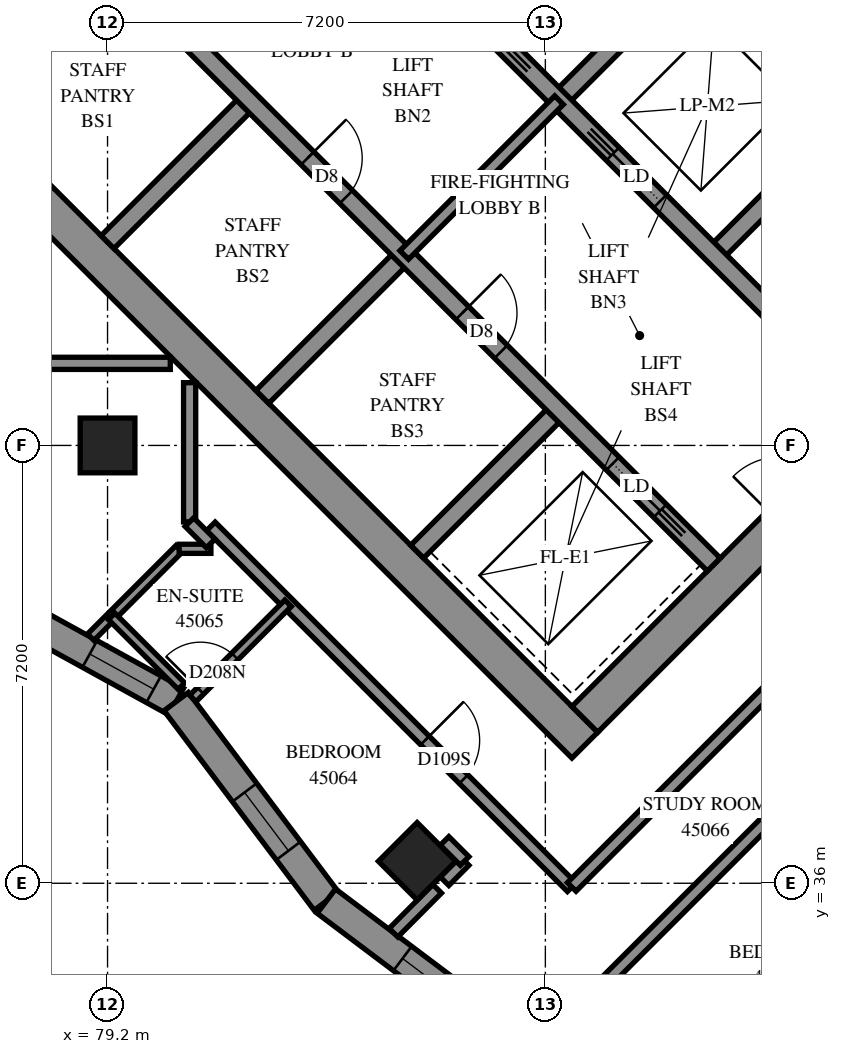
"""IFC4 building model, lengths in metres.
Left out: names, types, materials, properties, quantities, classifications, styles, units other than length and angle.
Written with IfcOpenShell. Run it as: python <this file> out.ifc"""

import sys

from ifc_helpers import new_model, si_unit, direction, frame, frame_2d, origin, origin_2d, place, context, subcontext, project, spatial, polyline, rectangle, outline, extrude, element, fill, save


model = new_model("IFC4")
c1 = context("Model", 3, precision=1e-05, world=origin(), true_north=direction((0.0, 1.0)))
c2 = subcontext(c1, "Body", "Model", "MODEL_VIEW")
j1 = project(units=[si_unit("LENGTHUNIT", "METRE"), si_unit("PLANEANGLEUNIT", "RADIAN")], contexts=[c1])
p1 = place(None, origin())
s1 = spatial("IfcSite", under=j1, at=p1, CompositionType="ELEMENT")
p2 = place(p1, origin())
s2 = spatial("IfcBuilding", under=s1, at=p2, CompositionType="ELEMENT")
p3 = place(p2, frame((0.0, 0.0, 166.0)))
s3 = spatial("IfcBuildingStorey", under=s2, at=p3, CompositionType="ELEMENT", Elevation=166.0)
for number, where, z_axis, x_axis in (
    (1, (79.2, 43.2, 0.0), (0.0, 0.0, 1.0), (1.0, 0.0, 0.0)),
    (2, (84.291, 36.362, 0.0), (0.0, 0.0, 1.0), (0.707, -0.707, 0.0)),
):
    element("IfcColumn", number, at=place(p3, frame(where, z_axis=z_axis, x_axis=x_axis)), inside=s3, PredefinedType="COLUMN", context=c2, shape_type="SweptSolid", body=[
        extrude(rectangle(XDim=0.9, YDim=0.9, at=origin_2d()), origin(), (0.0, 0.0, 1.0), 3.1),
    ])
p4 = place(p3, frame((76.018, 49.302, -0.3), z_axis=(0.0, 0.0, 1.0), x_axis=(0.7071067812, -0.7071067812, 0.0)))
e3 = element("IfcWall", 3, at=p4, inside=s3, PredefinedType="SHEAR", context=c2, shape_type="SweptSolid", body=[
    extrude(rectangle(XDim=15.6, YDim=0.6, at=frame_2d((7.8, 0.0))), origin(), (0.0, 0.0, 1.0), 2.7),
])
p5 = place(p3, frame((86.625, 59.908, -0.3), z_axis=(0.0, 0.0, 1.0), x_axis=(0.7071067812, -0.7071067812, 0.0)))
e4 = element("IfcWall", 4, at=p5, inside=s3, PredefinedType="SHEAR", context=c2, shape_type="SweptSolid", body=[
    extrude(rectangle(XDim=15.6, YDim=0.6, at=frame_2d((7.8, 0.0))), origin(), (0.0, 0.0, 1.0), 2.7),
])
p6 = place(p5, frame((10.6, 0.0, 0.3)))
e5 = element("IfcOpeningElement", 5, at=p6, cuts=e4, PredefinedType="OPENING", context=c2, shape_type="SweptSolid", body=[
    extrude(rectangle(XDim=0.8, YDim=2.1, at=frame_2d((0.4, 1.05))), frame((0.0, 0.31, 0.0), z_axis=(0.0, -1.0, 0.0), x_axis=(1.0, 0.0, 0.0)), (0.0, 0.0, 1.0), 0.62),
])
p7 = place(p3, frame((76.442, 49.302, -0.3), z_axis=(0.0, 0.0, 1.0), x_axis=(0.7071067812, 0.7071067812, 0.0)))
e6 = element("IfcWall", 6, at=p7, inside=s3, PredefinedType="SHEAR", context=c2, shape_type="SweptSolid", body=[
    extrude(rectangle(XDim=14.4, YDim=0.6, at=frame_2d((7.2, 0.0))), origin(), (0.0, 0.0, 1.0), 2.7),
])
p8 = place(p7, frame((4.55, 0.0, 0.3)))
e7 = element("IfcOpeningElement", 7, at=p8, cuts=e6, PredefinedType="OPENING", context=c2, shape_type="SweptSolid", body=[
    extrude(rectangle(XDim=1.1, YDim=2.1, at=frame_2d((0.55, 1.05))), frame((0.0, 0.31, 0.0), z_axis=(0.0, -1.0, 0.0), x_axis=(1.0, 0.0, 0.0)), (0.0, 0.0, 1.0), 0.62),
])
p9 = place(p7, frame((11.35, 0.0, 0.3)))
e8 = element("IfcOpeningElement", 8, at=p9, cuts=e6, PredefinedType="OPENING", context=c2, shape_type="SweptSolid", body=[
    extrude(rectangle(XDim=1.1, YDim=2.1, at=frame_2d((0.55, 1.05))), frame((0.0, 0.31, 0.0), z_axis=(0.0, -1.0, 0.0), x_axis=(1.0, 0.0, 0.0)), (0.0, 0.0, 1.0), 0.62),
])
p10 = place(p3, frame((87.049, 38.695, -0.3), z_axis=(0.0, 0.0, 1.0), x_axis=(0.7071067812, 0.7071067812, 0.0)))
e9 = element("IfcWall", 9, at=p10, inside=s3, PredefinedType="SHEAR", context=c2, shape_type="SweptSolid", body=[
    extrude(rectangle(XDim=14.4, YDim=0.6, at=frame_2d((7.2, 0.0))), origin(), (0.0, 0.0, 1.0), 2.7),
])
p11 = place(p10, frame((4.55, 0.0, 0.3)))
e10 = element("IfcOpeningElement", 10, at=p11, cuts=e9, PredefinedType="OPENING", context=c2, shape_type="SweptSolid", body=[
    extrude(rectangle(XDim=1.1, YDim=2.1, at=frame_2d((0.55, 1.05))), frame((0.0, 0.31, 0.0), z_axis=(0.0, -1.0, 0.0), x_axis=(1.0, 0.0, 0.0)), (0.0, 0.0, 1.0), 0.62),
])
p12 = place(p10, frame((11.35, 0.0, 0.3)))
e11 = element("IfcOpeningElement", 11, at=p12, cuts=e9, PredefinedType="OPENING", context=c2, shape_type="SweptSolid", body=[
    extrude(rectangle(XDim=1.1, YDim=2.1, at=frame_2d((0.55, 1.05))), frame((0.0, 0.31, 0.0), z_axis=(0.0, -1.0, 0.0), x_axis=(1.0, 0.0, 0.0)), (0.0, 0.0, 1.0), 0.62),
])
p13 = place(p3, frame((79.2, 46.544, 0.0), z_axis=(0.0, 0.0, 1.0), x_axis=(0.7071219326, 0.7070916295, 0.0)))
e12 = element("IfcWall", 12, at=p13, inside=s3, PredefinedType="SOLIDWALL", context=c2, shape_type="SweptSolid", body=[
    extrude(rectangle(XDim=3.3, YDim=0.3, at=frame_2d((1.65, 0.0))), origin(), (0.0, 0.0, 1.0), 3.1),
])
p14 = place(p3, frame((81.746, 43.999, 0.0), z_axis=(0.0, 0.0, 1.0), x_axis=(0.7071067812, 0.7071067812, 0.0)))
e13 = element("IfcWall", 13, at=p14, inside=s3, PredefinedType="SOLIDWALL", context=c2, shape_type="SweptSolid", body=[
    extrude(rectangle(XDim=3.3, YDim=0.3, at=frame_2d((1.65, 0.0))), origin(), (0.0, 0.0, 1.0), 3.1),
])
p15 = place(p3, frame((86.625, 48.878, 0.0), z_axis=(0.0, 0.0, 1.0), x_axis=(0.7071067812, 0.7071067812, 0.0)))
e14 = element("IfcWall", 14, at=p15, inside=s3, PredefinedType="SOLIDWALL", context=c2, shape_type="SweptSolid", body=[
    extrude(rectangle(XDim=3.3, YDim=0.3, at=frame_2d((1.65, 0.0))), origin(), (0.0, 0.0, 1.0), 3.1),
])
p16 = place(p3, frame((84.291, 41.453, 0.0), z_axis=(0.0, 0.0, 1.0), x_axis=(0.7071067812, 0.7071067812, 0.0)))
e15 = element("IfcWall", 15, at=p16, inside=s3, PredefinedType="SOLIDWALL", context=c2, shape_type="SweptSolid", body=[
    extrude(rectangle(XDim=3.3, YDim=0.3, at=frame_2d((1.65, 0.0))), origin(), (0.0, 0.0, 1.0), 3.1),
])
p17 = place(p3, frame((89.17, 46.332, 0.0), z_axis=(0.0, 0.0, 1.0), x_axis=(0.7071067812, 0.7071067812, 0.0)))
e16 = element("IfcWall", 16, at=p17, inside=s3, PredefinedType="SOLIDWALL", context=c2, shape_type="SweptSolid", body=[
    extrude(rectangle(XDim=3.3, YDim=0.3, at=frame_2d((1.65, 0.0))), origin(), (0.0, 0.0, 1.0), 3.1),
])
p18 = place(p3, frame((78.988, 51.423, 0.0), z_axis=(0.0, 0.0, 1.0), x_axis=(0.7071067812, -0.7071067812, 0.0)))
e17 = element("IfcWall", 17, at=p18, inside=s3, PredefinedType="SOLIDWALL", context=c2, shape_type="SweptSolid", body=[
    extrude(rectangle(XDim=14.4, YDim=0.3, at=frame_2d((7.2, 0.0))), origin(), (0.0, 0.0, 1.0), 3.1),
])
p19 = place(p18, frame((1.35, 0.0, 0.0)))
e18 = element("IfcOpeningElement", 18, at=p19, cuts=e17, PredefinedType="OPENING", context=c2, shape_type="SweptSolid", body=[
    extrude(rectangle(XDim=0.9, YDim=2.1, at=frame_2d((0.45, 1.05))), frame((0.0, 0.16, 0.0), z_axis=(0.0, -1.0, 0.0), x_axis=(1.0, 0.0, 0.0)), (0.0, 0.0, 1.0), 0.32),
])
p20 = place(p18, frame((4.95, 0.0, 0.0)))
e19 = element("IfcOpeningElement", 19, at=p20, cuts=e17, PredefinedType="OPENING", context=c2, shape_type="SweptSolid", body=[
    extrude(rectangle(XDim=0.9, YDim=2.1, at=frame_2d((0.45, 1.05))), frame((0.0, 0.16, 0.0), z_axis=(0.0, -1.0, 0.0), x_axis=(1.0, 0.0, 0.0)), (0.0, 0.0, 1.0), 0.32),
])
p21 = place(p18, frame((8.55, 0.0, 0.0)))
e20 = element("IfcOpeningElement", 20, at=p21, cuts=e17, PredefinedType="OPENING", context=c2, shape_type="SweptSolid", body=[
    extrude(rectangle(XDim=0.9, YDim=2.1, at=frame_2d((0.45, 1.05))), frame((0.0, 0.16, 0.0), z_axis=(0.0, -1.0, 0.0), x_axis=(1.0, 0.0, 0.0)), (0.0, 0.0, 1.0), 0.32),
])
p22 = place(p18, frame((12.05, 0.0, 0.0)))
e21 = element("IfcOpeningElement", 21, at=p22, cuts=e17, PredefinedType="OPENING", context=c2, shape_type="SweptSolid", body=[
    extrude(rectangle(XDim=1.1, YDim=2.1, at=frame_2d((0.55, 1.05))), frame((0.0, 0.16, 0.0), z_axis=(0.0, -1.0, 0.0), x_axis=(1.0, 0.0, 0.0)), (0.0, 0.0, 1.0), 0.32),
])
p23 = place(p3, frame((81.534, 53.969, 0.0), z_axis=(0.0, 0.0, 1.0), x_axis=(0.707103309, -0.7071102534, 0.0)))
e22 = element("IfcWall", 22, at=p23, inside=s3, PredefinedType="SOLIDWALL", context=c2, shape_type="SweptSolid", body=[
    extrude(rectangle(XDim=14.4, YDim=0.3, at=frame_2d((7.2, 0.0))), origin(), (0.0, 0.0, 1.0), 3.1),
])
p24 = place(p23, frame((1.25, 0.0, 0.0)))
e23 = element("IfcOpeningElement", 23, at=p24, cuts=e22, PredefinedType="OPENING", context=c2, shape_type="SweptSolid", body=[
    extrude(rectangle(XDim=1.1, YDim=2.1, at=frame_2d((0.55, 1.05))), frame((0.0, 0.16, 0.0), z_axis=(0.0, -1.0, 0.0), x_axis=(1.0, 0.0, 0.0)), (0.0, 0.0, 1.0), 0.32),
])
p25 = place(p23, frame((4.85, 0.0, 0.0)))
e24 = element("IfcOpeningElement", 24, at=p25, cuts=e22, PredefinedType="OPENING", context=c2, shape_type="SweptSolid", body=[
    extrude(rectangle(XDim=1.1, YDim=2.1, at=frame_2d((0.55, 1.05))), frame((0.0, 0.16, 0.0), z_axis=(0.0, -1.0, 0.0), x_axis=(1.0, 0.0, 0.0)), (0.0, 0.0, 1.0), 0.32),
])
p26 = place(p23, frame((8.45, 0.0, 0.0)))
e25 = element("IfcOpeningElement", 25, at=p26, cuts=e22, PredefinedType="OPENING", context=c2, shape_type="SweptSolid", body=[
    extrude(rectangle(XDim=1.1, YDim=2.1, at=frame_2d((0.55, 1.05))), frame((0.0, 0.16, 0.0), z_axis=(0.0, -1.0, 0.0), x_axis=(1.0, 0.0, 0.0)), (0.0, 0.0, 1.0), 0.32),
])
p27 = place(p23, frame((12.05, 0.0, 0.0)))
e26 = element("IfcOpeningElement", 26, at=p27, cuts=e22, PredefinedType="OPENING", context=c2, shape_type="SweptSolid", body=[
    extrude(rectangle(XDim=1.1, YDim=2.1, at=frame_2d((0.55, 1.05))), frame((0.0, 0.16, 0.0), z_axis=(0.0, -1.0, 0.0), x_axis=(1.0, 0.0, 0.0)), (0.0, 0.0, 1.0), 0.32),
])
p28 = place(p3, frame((88.958, 51.211, 0.0), z_axis=(0.0, 0.0, 1.0), x_axis=(0.7070998367, -0.7071137256, 0.0)))
e27 = element("IfcWall", 27, at=p28, inside=s3, PredefinedType="SOLIDWALL", context=c2, shape_type="SweptSolid", body=[
    extrude(rectangle(XDim=7.2, YDim=0.3, at=frame_2d((3.6, 0.0))), origin(), (0.0, 0.0, 1.0), 3.1),
])
p29 = place(p3, frame((76.572, 41.057, 0.0), z_axis=(0.0, 0.0, 1.0), x_axis=(0.8758607795, -0.4825638765, 0.0)))
e28 = element("IfcWall", 28, at=p29, inside=s3, PredefinedType="SOLIDWALL", context=c2, shape_type="SweptSolid", body=[
    extrude(outline(polyline([(0.022, -0.25), (4.236, -0.25), (4.343, 0.25), (-0.022, 0.25), (0.022, -0.25)])), origin(), (0.0, 0.0, 1.0), 3.1),
])
p30 = place(p29, frame((0.322, 0.0, 0.45)))
e29 = element("IfcOpeningElement", 29, at=p30, cuts=e28, PredefinedType="OPENING", context=c2, shape_type="SweptSolid", body=[
    extrude(rectangle(XDim=1.2, YDim=2.5, at=frame_2d((0.6, 1.25))), frame((0.0, 0.26, 0.0), z_axis=(0.0, -1.0, 0.0), x_axis=(1.0, 0.0, 0.0)), (0.0, 0.0, 1.0), 0.52),
])
p31 = place(p29, frame((2.666, 0.0, 0.45)))
e30 = element("IfcOpeningElement", 30, at=p31, cuts=e28, PredefinedType="OPENING", context=c2, shape_type="SweptSolid", body=[
    extrude(rectangle(XDim=1.2, YDim=2.5, at=frame_2d((0.6, 1.25))), frame((0.0, 0.26, 0.0), z_axis=(0.0, -1.0, 0.0), x_axis=(1.0, 0.0, 0.0)), (0.0, 0.0, 1.0), 0.52),
])
p32 = place(p3, frame((80.329, 38.987, 0.0), z_axis=(0.0, 0.0, 1.0), x_axis=(0.601211036, -0.7990902891, 0.0)))
e31 = element("IfcWall", 31, at=p32, inside=s3, PredefinedType="SOLIDWALL", context=c2, shape_type="SweptSolid", body=[
    extrude(outline(polyline([(0.054, -0.25), (4.142, -0.25), (4.071, 0.25), (-0.054, 0.25), (0.054, -0.25)])), origin(), (0.0, 0.0, 1.0), 3.1),
])
p33 = place(p32, frame((1.87, 0.0, 0.45)))
e32 = element("IfcOpeningElement", 32, at=p33, cuts=e31, PredefinedType="OPENING", context=c2, shape_type="SweptSolid", body=[
    extrude(rectangle(XDim=1.2, YDim=2.5, at=frame_2d((0.6, 1.25))), frame((0.0, 0.26, 0.0), z_axis=(0.0, -1.0, 0.0), x_axis=(1.0, 0.0, 0.0)), (0.0, 0.0, 1.0), 0.52),
])
p34 = place(p3, frame((82.798, 35.706, 0.0), z_axis=(0.0, 0.0, 1.0), x_axis=(0.7990920997, -0.6012086295, 0.0)))
e33 = element("IfcWall", 33, at=p34, inside=s3, PredefinedType="SOLIDWALL", context=c2, shape_type="SweptSolid", body=[
    extrude(outline(polyline([(-0.035, -0.25), (4.053, -0.25), (4.124, 0.25), (0.035, 0.25), (-0.035, -0.25)])), origin(), (0.0, 0.0, 1.0), 3.1),
])
p35 = place(p34, frame((1.569, 0.0, 0.7)))
e34 = element("IfcOpeningElement", 34, at=p35, cuts=e33, PredefinedType="OPENING", context=c2, shape_type="SweptSolid", body=[
    extrude(rectangle(XDim=1.8, YDim=2.2, at=frame_2d((0.9, 1.1))), frame((0.0, 0.26, 0.0), z_axis=(0.0, -1.0, 0.0), x_axis=(1.0, 0.0, 0.0)), (0.0, 0.0, 1.0), 0.52),
])
p36 = place(p3, frame((84.079, 46.332, 0.0), z_axis=(0.0, 0.0, 1.0), x_axis=(0.7071067812, 0.7071067812, 0.0)))
e35 = element("IfcWall", 35, at=p36, inside=s3, PredefinedType="PARTITIONING", context=c2, shape_type="SweptSolid", body=[
    extrude(rectangle(XDim=3.6, YDim=0.2, at=frame_2d((1.8, 0.0))), origin(), (0.0, 0.0, 1.0), 3.1),
])
p37 = place(p3, frame((80.899, 41.869, 0.0), z_axis=(0.0, 0.0, 1.0), x_axis=(0.7071067812, -0.7071067812, 0.0)))
e36 = element("IfcWall", 36, at=p37, inside=s3, PredefinedType="PARTITIONING", context=c2, shape_type="SweptSolid", body=[
    extrude(rectangle(XDim=8.392, YDim=0.2, at=frame_2d((4.196, 0.0))), origin(), (0.0, 0.0, 1.0), 3.1),
])
p38 = place(p37, frame((4.979, 0.0, 0.0)))
e37 = element("IfcOpeningElement", 37, at=p38, cuts=e36, PredefinedType="OPENING", context=c2, shape_type="SweptSolid", body=[
    extrude(rectangle(XDim=0.9, YDim=2.1, at=frame_2d((0.45, 1.05))), frame((0.0, 0.11, 0.0), z_axis=(0.0, -1.0, 0.0), x_axis=(1.0, 0.0, 0.0)), (0.0, 0.0, 1.0), 0.22),
])
p39 = place(p3, frame((86.834, 35.94, 0.0), z_axis=(0.0, 0.0, 1.0), x_axis=(0.7072486139, 0.7069649201, 0.0)))
e38 = element("IfcWall", 38, at=p39, inside=s3, PredefinedType="PARTITIONING", context=c2, shape_type="SweptSolid", body=[
    extrude(rectangle(XDim=7.05, YDim=0.2, at=frame_2d((3.525, 0.0))), origin(), (0.0, 0.0, 1.0), 3.1),
])
p40 = place(p39, frame((5.848, 0.0, 0.0)))
e39 = element("IfcOpeningElement", 39, at=p40, cuts=e38, PredefinedType="OPENING", context=c2, shape_type="SweptSolid", body=[
    extrude(rectangle(XDim=1.0, YDim=2.1, at=frame_2d((0.5, 1.05))), frame((0.0, 0.11, 0.0), z_axis=(0.0, -1.0, 0.0), x_axis=(1.0, 0.0, 0.0)), (0.0, 0.0, 1.0), 0.22),
])
p41 = place(p3, frame((86.329, 33.313, 0.0), z_axis=(0.0, 0.0, 1.0), x_axis=(0.7072524412, 0.7069610911, 0.0)))
e40 = element("IfcWall", 40, at=p41, inside=s3, PredefinedType="PARTITIONING", context=c2, shape_type="SweptSolid", body=[
    extrude(rectangle(XDim=6.865, YDim=0.2, at=frame_2d((3.432, 0.0))), origin(), (0.0, 0.0, 1.0), 3.1),
])
p42 = place(p3, frame((89.831, 31.721, 0.0), z_axis=(0.0, 0.0, 1.0), x_axis=(0.7071067812, 0.7071067812, 0.0)))
e41 = element("IfcWall", 41, at=p42, inside=s3, PredefinedType="PARTITIONING", context=c2, shape_type="SweptSolid", body=[
    extrude(rectangle(XDim=5.928, YDim=0.2, at=frame_2d((2.964, 0.0))), origin(), (0.0, 0.0, 1.0), 3.1),
])
for number, where, z_axis, x_axis in (
    (42, (77.942, 44.55, 0.0), (0.0, 0.0, 1.0), (1.0, 0.0, 0.0)),
    (43, (80.55, 41.942, 0.0), (0.0, 0.0, 1.0), (0.0, 1.0, 0.0)),
):
    element("IfcWall", number, at=place(p3, frame(where, z_axis=z_axis, x_axis=x_axis)), inside=s3, PredefinedType="PARTITIONING", context=c2, shape_type="SweptSolid", body=[
        extrude(rectangle(XDim=2.29, YDim=0.2, at=frame_2d((1.145, 0.0))), origin(), (0.0, 0.0, 1.0), 3.1),
    ])
p43 = place(p3, frame((80.603, 39.039, 0.0), z_axis=(0.0, 0.0, 1.0), x_axis=(0.7071293598, 0.7070842018, 0.0)))
e44 = element("IfcWall", 44, at=p43, inside=s3, PredefinedType="PARTITIONING", context=c2, shape_type="SweptSolid", body=[
    extrude(rectangle(XDim=2.214, YDim=0.15, at=frame_2d((1.107, 0.0))), origin(), (0.0, 0.0, 1.0), 3.1),
])
p44 = place(p43, frame((0.177, 0.0, 0.0)))
e45 = element("IfcOpeningElement", 45, at=p44, cuts=e44, PredefinedType="OPENING", context=c2, shape_type="SweptSolid", body=[
    extrude(rectangle(XDim=0.8, YDim=2.1, at=frame_2d((0.4, 1.05))), frame((0.0, 0.085, 0.0), z_axis=(0.0, -1.0, 0.0), x_axis=(1.0, 0.0, 0.0)), (0.0, 0.0, 1.0), 0.17),
])
p45 = place(p3, frame((78.924, 40.047, 0.0), z_axis=(0.0, 0.0, 1.0), x_axis=(0.7071067812, 0.7071067812, 0.0)))
e46 = element("IfcWall", 46, at=p45, inside=s3, PredefinedType="PARTITIONING", context=c2, shape_type="SweptSolid", body=[
    extrude(rectangle(XDim=2.056, YDim=0.15, at=frame_2d((1.028, 0.0))), origin(), (0.0, 0.0, 1.0), 3.1),
])
p46 = place(p3, frame((79.267, 40.389, 0.0), z_axis=(0.0, 0.0, 1.0), x_axis=(0.7071375765, -0.7070759845, 0.0)))
e47 = element("IfcWall", 47, at=p46, inside=s3, PredefinedType="PARTITIONING", context=c2, shape_type="SweptSolid", body=[
    extrude(rectangle(XDim=1.624, YDim=0.15, at=frame_2d((0.812, 0.0))), origin(), (0.0, 0.0, 1.0), 3.1),
])
p47 = place(p3, frame((83.903, 35.188, 0.0), z_axis=(0.0, 0.0, 1.0), x_axis=(0.705188447, 0.7090199251, 0.0)))
e48 = element("IfcWall", 48, at=p47, inside=s3, PredefinedType="PARTITIONING", context=c2, shape_type="SweptSolid", body=[
    extrude(rectangle(XDim=1.018, YDim=0.2, at=frame_2d((0.509, 0.0))), origin(), (0.0, 0.0, 1.0), 3.1),
])
p48 = place(p3, frame((80.378, 41.5, 0.0), z_axis=(0.0, 0.0, 1.0), x_axis=(1.0, 0.0, 0.0)))
e49 = element("IfcWall", 49, at=p48, inside=s3, PredefinedType="PARTITIONING", context=c2, shape_type="SweptSolid", body=[
    extrude(rectangle(XDim=0.522, YDim=0.15, at=frame_2d((0.261, 0.0))), origin(), (0.0, 0.0, 1.0), 3.1),
])
p49 = place(p3, frame((80.546, 41.938, 0.0), z_axis=(0.0, 0.0, 1.0), x_axis=(0.7071067812, -0.7071067812, 0.0)))
e50 = element("IfcWall", 50, at=p49, inside=s3, PredefinedType="PARTITIONING", context=c2, shape_type="SweptSolid", body=[
    extrude(rectangle(XDim=0.495, YDim=0.2, at=frame_2d((0.247, 0.0))), origin(), (0.0, 0.0, 1.0), 3.1),
])
p50 = place(p3, frame((84.742, 36.034, 0.0), z_axis=(0.0, 0.0, 1.0), x_axis=(0.7049672897, 0.7092398187, 0.0)))
e51 = element("IfcWall", 51, at=p50, inside=s3, PredefinedType="PARTITIONING", context=c2, shape_type="SweptSolid", body=[
    extrude(rectangle(XDim=0.468, YDim=0.2, at=frame_2d((0.234, 0.0))), origin(), (0.0, 0.0, 1.0), 3.1),
])
p51 = place(p3, frame((84.742, 36.696, 0.0), z_axis=(0.0, 0.0, 1.0), x_axis=(0.7071067812, -0.7071067812, 0.0)))
e52 = element("IfcWall", 52, at=p51, inside=s3, PredefinedType="PARTITIONING", context=c2, shape_type="SweptSolid", body=[
    extrude(rectangle(XDim=0.467, YDim=0.2, at=frame_2d((0.233, 0.0))), origin(), (0.0, 0.0, 1.0), 3.1),
])
p52 = place(p31, origin())
e53 = element("IfcWindow", 53, at=p52, inside=s3, PartitioningType="SINGLE_PANEL", PredefinedType="WINDOW", context=c2, shape_type="SweptSolid", body=[
    extrude(rectangle(XDim=1.2, YDim=2.5, at=frame_2d((0.6, 1.25))), frame((0.0, 0.18, 0.0), z_axis=(0.0, -1.0, 0.0), x_axis=(1.0, 0.0, 0.0)), (0.0, 0.0, 1.0), 0.06),
])
fill(e30, e53)
p53 = place(p33, origin())
e54 = element("IfcWindow", 54, at=p53, inside=s3, PartitioningType="SINGLE_PANEL", PredefinedType="WINDOW", context=c2, shape_type="SweptSolid", body=[
    extrude(rectangle(XDim=1.2, YDim=2.5, at=frame_2d((0.6, 1.25))), frame((0.0, 0.18, 0.0), z_axis=(0.0, -1.0, 0.0), x_axis=(1.0, 0.0, 0.0)), (0.0, 0.0, 1.0), 0.06),
])
fill(e32, e54)
p54 = place(p20, origin())
e55 = element("IfcDoor", 55, at=p54, inside=s3, OperationType="SINGLE_SWING_LEFT", PredefinedType="DOOR", context=c2, shape_type="SweptSolid", body=[
    extrude(rectangle(XDim=0.9, YDim=2.1, at=frame_2d((0.45, 1.05))), frame((0.0, 0.025, 0.0), z_axis=(0.0, -1.0, 0.0), x_axis=(1.0, 0.0, 0.0)), (0.0, 0.0, 1.0), 0.05),
])
fill(e19, e55)
p55 = place(p21, origin())
e56 = element("IfcDoor", 56, at=p55, inside=s3, OperationType="SINGLE_SWING_LEFT", PredefinedType="DOOR", context=c2, shape_type="SweptSolid", body=[
    extrude(rectangle(XDim=0.9, YDim=2.1, at=frame_2d((0.45, 1.05))), frame((0.0, 0.025, 0.0), z_axis=(0.0, -1.0, 0.0), x_axis=(1.0, 0.0, 0.0)), (0.0, 0.0, 1.0), 0.05),
])
fill(e20, e56)
p56 = place(p22, origin())
e57 = element("IfcDoor", 57, at=p56, inside=s3, OperationType="SLIDING_TO_RIGHT", PredefinedType="DOOR", context=c2, shape_type="SweptSolid", body=[
    extrude(rectangle(XDim=1.1, YDim=2.1, at=frame_2d((0.55, 1.05))), frame((0.0, 0.025, 0.0), z_axis=(0.0, -1.0, 0.0), x_axis=(1.0, 0.0, 0.0)), (0.0, 0.0, 1.0), 0.05),
])
fill(e21, e57)
p57 = place(p26, origin())
e58 = element("IfcDoor", 58, at=p57, inside=s3, OperationType="SLIDING_TO_LEFT", PredefinedType="DOOR", context=c2, shape_type="SweptSolid", body=[
    extrude(rectangle(XDim=1.1, YDim=2.1, at=frame_2d((0.55, 1.05))), frame((0.0, 0.025, 0.0), z_axis=(0.0, -1.0, 0.0), x_axis=(1.0, 0.0, 0.0)), (0.0, 0.0, 1.0), 0.05),
])
fill(e25, e58)
p58 = place(p38, origin())
e59 = element("IfcDoor", 59, at=p58, inside=s3, OperationType="SINGLE_SWING_RIGHT", PredefinedType="DOOR", context=c2, shape_type="SweptSolid", body=[
    extrude(rectangle(XDim=0.9, YDim=2.1, at=frame_2d((0.45, 1.05))), frame((0.0, 0.025, 0.0), z_axis=(0.0, -1.0, 0.0), x_axis=(1.0, 0.0, 0.0)), (0.0, 0.0, 1.0), 0.05),
])
fill(e37, e59)
p59 = place(p44, origin())
e60 = element("IfcDoor", 60, at=p59, inside=s3, OperationType="SINGLE_SWING_RIGHT", PredefinedType="DOOR", context=c2, shape_type="SweptSolid", body=[
    extrude(rectangle(XDim=0.8, YDim=2.1, at=frame_2d((0.4, 1.05))), frame((0.0, 0.025, 0.0), z_axis=(0.0, -1.0, 0.0), x_axis=(1.0, 0.0, 0.0)), (0.0, 0.0, 1.0), 0.05),
])
fill(e45, e60)
p60 = place(p35, origin())
e61 = element("IfcWindow", 61, at=p60, inside=s3, PartitioningType="SINGLE_PANEL", PredefinedType="WINDOW", context=c2, shape_type="SweptSolid", body=[
    extrude(rectangle(XDim=1.8, YDim=2.2, at=frame_2d((0.9, 1.1))), frame((0.0, 0.18, 0.0), z_axis=(0.0, -1.0, 0.0), x_axis=(1.0, 0.0, 0.0)), (0.0, 0.0, 1.0), 0.06),
])
fill(e34, e61)
save(model, sys.argv[1])
